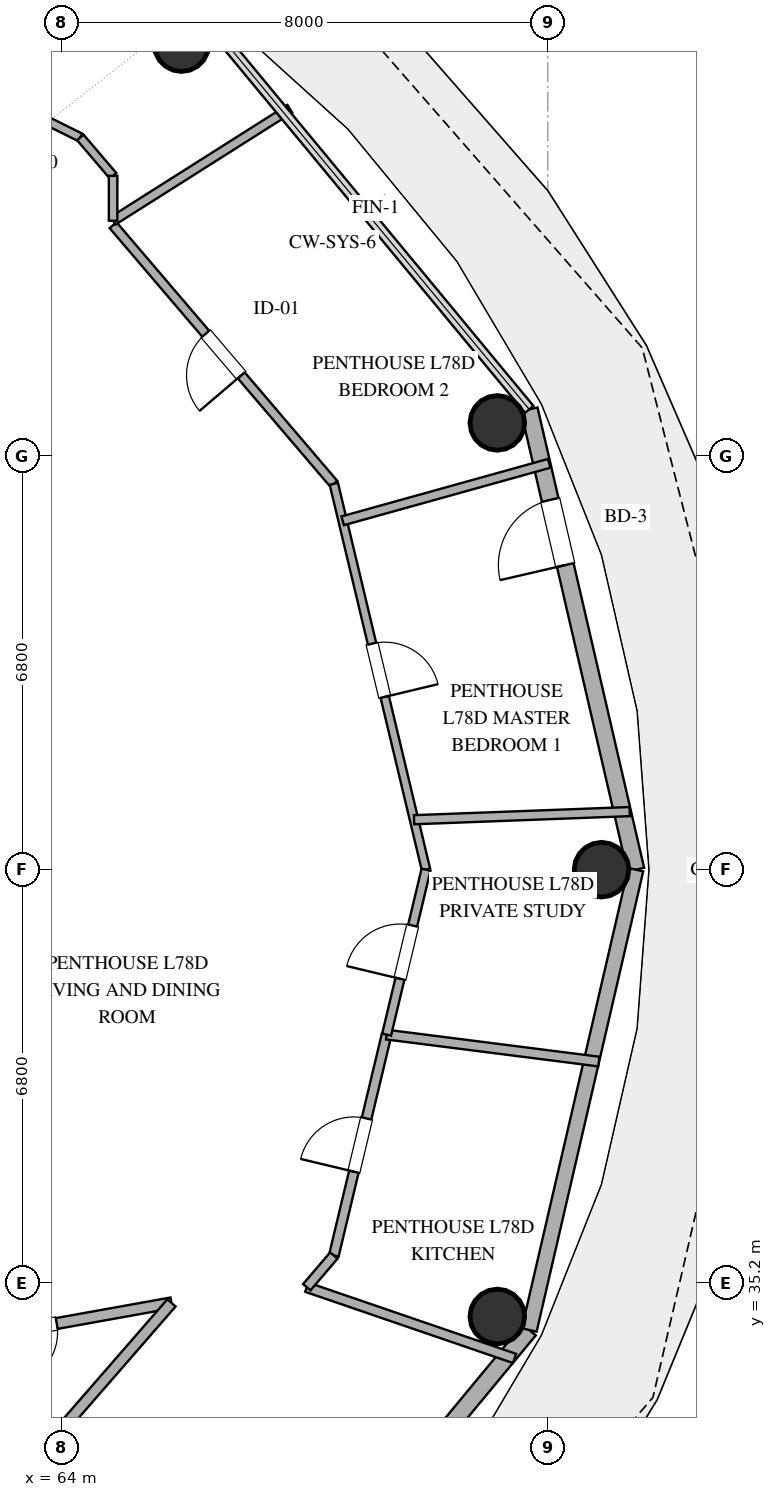
"""IFC4 building model, lengths in metres.
Left out: names, types, materials, properties, quantities, classifications, styles, units other than length and angle.
Written with IfcOpenShell. Run it as: python <this file> out.ifc"""

import sys

from ifc_helpers import new_model, si_unit, direction, frame, frame_2d, origin, origin_2d, place, context, subcontext, project, spatial, rectangle, hollow_circle, extrude, element, fill, save


model = new_model("IFC4")
c1 = context("Model", 3, precision=1e-05, world=origin(), true_north=direction((0.0, 1.0)))
c2 = subcontext(c1, "Body", "Model", "MODEL_VIEW")
j1 = project(units=[si_unit("LENGTHUNIT", "METRE"), si_unit("PLANEANGLEUNIT", "RADIAN")], contexts=[c1])
p1 = place(None, origin())
s1 = spatial("IfcSite", under=j1, at=p1, CompositionType="ELEMENT")
p2 = place(p1, origin())
s2 = spatial("IfcBuilding", under=s1, at=p2, CompositionType="ELEMENT")
p3 = place(p2, frame((0.0, 0.0, 301.8)))
s3 = spatial("IfcBuildingStorey", under=s2, at=p3, CompositionType="ELEMENT", Elevation=301.8)
for number, where, z_axis, x_axis in (
    (1, (72.883, 42.0, 0.0), (0.0, 0.0, 1.0), (1.0, 0.0, 0.0)),
    (2, (71.169, 49.347, 0.0), (0.0, 0.0, 1.0), (1.0, 0.0, 0.0)),
    (3, (65.975, 55.576, 0.0), (0.0, 0.0, 1.0), (1.0, 0.0, 0.0)),
    (4, (71.169, 34.653, 0.0), (0.0, 0.0, 1.0), (1.0, 0.0, 0.0)),
):
    element("IfcColumn", number, at=place(p3, frame(where, z_axis=z_axis, x_axis=x_axis)), inside=s3, PredefinedType="COLUMN", context=c2, shape_type="SweptSolid", body=[
        extrude(hollow_circle(Radius=0.45, WallThickness=0.025, at=origin_2d()), origin(), (0.0, 0.0, 1.0), 3.37),
    ])
p4 = place(p3, frame((73.447, 42.0, 0.0), z_axis=(0.0, 0.0, 1.0), x_axis=(-0.225635078214, 0.974211892495, 0.0)))
e5 = element("IfcWall", 5, at=p4, inside=s3, PredefinedType="SOLIDWALL", context=c2, shape_type="SweptSolid", body=[
    extrude(rectangle(XDim=7.77, YDim=0.28, at=frame_2d((3.885, 0.0))), origin(), (0.0, 0.0, 1.0), 3.37),
])
p5 = place(p4, frame((5.142, 0.0, 0.0)))
e6 = element("IfcOpeningElement", 6, at=p5, cuts=e5, PredefinedType="OPENING", context=c2, shape_type="SweptSolid", body=[
    extrude(rectangle(XDim=1.1, YDim=2.25, at=frame_2d((0.55, 1.125))), frame((0.0, 0.15, 0.0), z_axis=(0.0, -1.0, 0.0), x_axis=(1.0, 0.0, 0.0)), (0.0, 0.0, 1.0), 0.3),
])
p6 = place(p3, frame((66.383, 28.013, 0.0), z_axis=(0.0, 0.0, 1.0), x_axis=(0.63761509934, 0.770355103243, 0.0)))
e7 = element("IfcWall", 7, at=p6, inside=s3, PredefinedType="SOLIDWALL", context=c2, shape_type="SweptSolid", body=[
    extrude(rectangle(XDim=8.33, YDim=0.28, at=frame_2d((4.165, 0.0))), origin(), (0.0, 0.0, 1.0), 3.37),
])
p7 = place(p6, frame((2.326, 0.0, 0.85)))
e8 = element("IfcOpeningElement", 8, at=p7, cuts=e7, PredefinedType="OPENING", context=c2, shape_type="SweptSolid", body=[
    extrude(rectangle(XDim=1.35, YDim=1.8, at=frame_2d((0.675, 0.9))), frame((0.0, 0.15, 0.0), z_axis=(0.0, -1.0, 0.0), x_axis=(1.0, 0.0, 0.0)), (0.0, 0.0, 1.0), 0.3),
])
p8 = place(p6, frame((4.546, 0.0, 0.85)))
e9 = element("IfcOpeningElement", 9, at=p8, cuts=e7, PredefinedType="OPENING", context=c2, shape_type="SweptSolid", body=[
    extrude(rectangle(XDim=1.35, YDim=1.8, at=frame_2d((0.675, 0.9))), frame((0.0, 0.15, 0.0), z_axis=(0.0, -1.0, 0.0), x_axis=(1.0, 0.0, 0.0)), (0.0, 0.0, 1.0), 0.3),
])
p9 = place(p3, frame((71.694, 34.43, 0.0), z_axis=(0.0, 0.0, 1.0), x_axis=(0.225635078214, 0.974211892495, 0.0)))
e10 = element("IfcWall", 10, at=p9, inside=s3, PredefinedType="SOLIDWALL", context=c2, shape_type="SweptSolid", body=[
    extrude(rectangle(XDim=7.77, YDim=0.25, at=frame_2d((3.885, 0.0))), origin(), (0.0, 0.0, 1.0), 3.37),
])
p10 = place(p3, frame((56.704, 35.2, 0.0), z_axis=(0.0, 0.0, 1.0), x_axis=(0.78802314347, -0.615645616695, 0.0)))
e11 = element("IfcWall", 11, at=p10, inside=s3, PredefinedType="PARTITIONING", context=c2, shape_type="SweptSolid", body=[
    extrude(rectangle(XDim=12.034, YDim=0.2, at=frame_2d((6.017, 0.0))), origin(), (0.0, 0.0, 1.0), 2.73),
])
p11 = place(p3, frame((68.481, 48.345, 0.0), z_axis=(0.0, 0.0, 1.0), x_axis=(-0.649208179997, 0.760610767097, 0.0)))
e12 = element("IfcWall", 12, at=p11, inside=s3, PredefinedType="PARTITIONING", context=c2, shape_type="SweptSolid", body=[
    extrude(rectangle(XDim=5.593, YDim=0.15, at=frame_2d((2.796, 0.0))), origin(), (0.0, 0.0, 1.0), 2.73),
])
p12 = place(p11, frame((2.346, 0.0, 0.0)))
e13 = element("IfcOpeningElement", 13, at=p12, cuts=e12, PredefinedType="OPENING", context=c2, shape_type="SweptSolid", body=[
    extrude(rectangle(XDim=0.9, YDim=2.1, at=frame_2d((0.45, 1.05))), frame((0.0, 0.085, 0.0), z_axis=(0.0, -1.0, 0.0), x_axis=(1.0, 0.0, 0.0)), (0.0, 0.0, 1.0), 0.17),
])
p13 = place(p3, frame((68.481, 48.345, 0.0), z_axis=(0.0, 0.0, 1.0), x_axis=(0.232298462197, -0.972644551962, 0.0)))
e14 = element("IfcWall", 14, at=p13, inside=s3, PredefinedType="PARTITIONING", context=c2, shape_type="SweptSolid", body=[
    extrude(rectangle(XDim=6.523, YDim=0.14, at=frame_2d((3.262, 0.0))), origin(), (0.0, 0.0, 1.0), 2.73),
])
p14 = place(p13, frame((2.702, 0.0, 0.0)))
e15 = element("IfcOpeningElement", 15, at=p14, cuts=e14, PredefinedType="OPENING", context=c2, shape_type="SweptSolid", body=[
    extrude(rectangle(XDim=0.9, YDim=2.1, at=frame_2d((0.45, 1.05))), frame((0.0, 0.08, 0.0), z_axis=(0.0, -1.0, 0.0), x_axis=(1.0, 0.0, 0.0)), (0.0, 0.0, 1.0), 0.16),
])
p15 = place(p3, frame((65.81, 34.875, 0.0), z_axis=(0.0, 0.0, 1.0), x_axis=(-0.984255399889, -0.1767521083, 0.0)))
e16 = element("IfcWall", 16, at=p15, inside=s3, PredefinedType="PLUMBINGWALL", context=c2, shape_type="SweptSolid", body=[
    extrude(rectangle(XDim=4.684, YDim=0.18, at=frame_2d((2.342, 0.0))), origin(), (0.0, 0.0, 1.0), 2.73),
])
p16 = place(p15, frame((1.917, 0.0, 0.0)))
e17 = element("IfcOpeningElement", 17, at=p16, cuts=e16, PredefinedType="OPENING", context=c2, shape_type="SweptSolid", body=[
    extrude(rectangle(XDim=0.85, YDim=2.1, at=frame_2d((0.425, 1.05))), frame((0.0, 0.1, 0.0), z_axis=(0.0, -1.0, 0.0), x_axis=(1.0, 0.0, 0.0)), (0.0, 0.0, 1.0), 0.2),
])
p17 = place(p3, frame((68.481, 35.655, 0.0), z_axis=(0.0, 0.0, 1.0), x_axis=(0.232262682455, 0.972653096607, 0.0)))
e18 = element("IfcWall", 18, at=p17, inside=s3, PredefinedType="PLUMBINGWALL", context=c2, shape_type="SweptSolid", body=[
    extrude(rectangle(XDim=3.735, YDim=0.16, at=frame_2d((1.867, 0.0))), origin(), (0.0, 0.0, 1.0), 2.73),
])
p18 = place(p17, frame((1.417, 0.0, 0.0)))
e19 = element("IfcOpeningElement", 19, at=p18, cuts=e18, PredefinedType="OPENING", context=c2, shape_type="SweptSolid", body=[
    extrude(rectangle(XDim=0.9, YDim=2.1, at=frame_2d((0.45, 1.05))), frame((0.0, 0.09, 0.0), z_axis=(0.0, -1.0, 0.0), x_axis=(1.0, 0.0, 0.0)), (0.0, 0.0, 1.0), 0.18),
])
p19 = place(p3, frame((71.452, 33.962, 0.0), z_axis=(0.0, 0.0, 1.0), x_axis=(-0.945979125591, 0.32422753422, 0.0)))
e20 = element("IfcWall", 20, at=p19, inside=s3, PredefinedType="PLUMBINGWALL", context=c2, shape_type="SweptSolid", body=[
    extrude(rectangle(XDim=3.611, YDim=0.16, at=frame_2d((1.806, 0.0))), origin(), (0.0, 0.0, 1.0), 2.73),
])
p20 = place(p3, frame((63.45, 32.163, 0.0), z_axis=(0.0, 0.0, 1.0), x_axis=(0.656415720833, 0.754399364689, 0.0)))
e21 = element("IfcWall", 21, at=p20, inside=s3, PredefinedType="PLUMBINGWALL", context=c2, shape_type="SweptSolid", body=[
    extrude(rectangle(XDim=3.595, YDim=0.18, at=frame_2d((1.798, 0.0))), origin(), (0.0, 0.0, 1.0), 2.73),
])
p21 = place(p3, frame((69.8, 42.822, 0.0), z_axis=(0.0, 0.0, 1.0), x_axis=(0.999291840202, 0.037627358477, 0.0)))
e22 = element("IfcWall", 22, at=p21, inside=s3, PredefinedType="PARTITIONING", context=c2, shape_type="SweptSolid", body=[
    extrude(rectangle(XDim=3.549, YDim=0.15, at=frame_2d((1.774, 0.0))), origin(), (0.0, 0.0, 1.0), 2.73),
])
p22 = place(p3, frame((72.022, 48.682, 0.0), z_axis=(0.0, 0.0, 1.0), x_axis=(-0.963436508671, -0.267936734621, 0.0)))
e23 = element("IfcWall", 23, at=p22, inside=s3, PredefinedType="PARTITIONING", context=c2, shape_type="SweptSolid", body=[
    extrude(rectangle(XDim=3.525, YDim=0.15, at=frame_2d((1.763, 0.0))), origin(), (0.0, 0.0, 1.0), 2.73),
])
p23 = place(p3, frame((72.839, 38.844, 0.0), z_axis=(0.0, 0.0, 1.0), x_axis=(-0.992028222336, 0.126015896178, 0.0)))
e24 = element("IfcWall", 24, at=p23, inside=s3, PredefinedType="PLUMBINGWALL", context=c2, shape_type="SweptSolid", body=[
    extrude(rectangle(XDim=3.518, YDim=0.16, at=frame_2d((1.759, 0.0))), origin(), (0.0, 0.0, 1.0), 2.73),
])
p24 = place(p3, frame((64.85, 52.672, 0.0), z_axis=(0.0, 0.0, 1.0), x_axis=(0.84478165195, 0.535111166515, 0.0)))
e25 = element("IfcWall", 25, at=p24, inside=s3, PredefinedType="PARTITIONING", context=c2, shape_type="SweptSolid", body=[
    extrude(rectangle(XDim=3.44, YDim=0.15, at=frame_2d((1.72, 0.0))), origin(), (0.0, 0.0, 1.0), 2.73),
])
p25 = place(p3, frame((69.348, 39.288, 0.0), z_axis=(0.0, 0.0, 1.0), x_axis=(0.232346378521, 0.972633106772, 0.0)))
e26 = element("IfcWall", 26, at=p25, inside=s3, PredefinedType="PARTITIONING", context=c2, shape_type="SweptSolid", body=[
    extrude(rectangle(XDim=2.789, YDim=0.15, at=frame_2d((1.395, 0.0))), origin(), (0.0, 0.0, 1.0), 2.73),
])
p26 = place(p25, frame((0.944, 0.0, 0.0)))
e27 = element("IfcOpeningElement", 27, at=p26, cuts=e26, PredefinedType="OPENING", context=c2, shape_type="SweptSolid", body=[
    extrude(rectangle(XDim=0.9, YDim=2.1, at=frame_2d((0.45, 1.05))), frame((0.0, 0.085, 0.0), z_axis=(0.0, -1.0, 0.0), x_axis=(1.0, 0.0, 0.0)), (0.0, 0.0, 1.0), 0.17),
])
p27 = place(p3, frame((64.311, 54.042, 0.0), z_axis=(0.0, 0.0, 1.0), x_axis=(-0.895409226325, 0.445244109912, 0.0)))
e28 = element("IfcWall", 28, at=p27, inside=s3, PredefinedType="PARTITIONING", context=c2, shape_type="SweptSolid", body=[
    extrude(rectangle(XDim=1.141, YDim=0.14, at=frame_2d((0.571, 0.0))), origin(), (0.0, 0.0, 1.0), 2.73),
])
p28 = place(p3, frame((64.85, 53.41, 0.0), z_axis=(0.0, 0.0, 1.0), x_axis=(-0.649191857323, 0.760624698774, 0.0)))
e29 = element("IfcWall", 29, at=p28, inside=s3, PredefinedType="PARTITIONING", context=c2, shape_type="SweptSolid", body=[
    extrude(rectangle(XDim=0.83, YDim=0.14, at=frame_2d((0.415, 0.0))), origin(), (0.0, 0.0, 1.0), 2.73),
])
p29 = place(p3, frame((64.85, 52.672, 0.0), z_axis=(0.0, 0.0, 1.0), x_axis=(0.0, 1.0, 0.0)))
e30 = element("IfcWall", 30, at=p29, inside=s3, PredefinedType="PARTITIONING", context=c2, shape_type="SweptSolid", body=[
    extrude(rectangle(XDim=0.739, YDim=0.14, at=frame_2d((0.369, 0.0))), origin(), (0.0, 0.0, 1.0), 2.73),
])
p30 = place(p3, frame((68.036, 35.133, 0.0), z_axis=(0.0, 0.0, 1.0), x_axis=(0.649207140033, 0.760611654743, 0.0)))
e31 = element("IfcWall", 31, at=p30, inside=s3, PredefinedType="PLUMBINGWALL", context=c2, shape_type="SweptSolid", body=[
    extrude(rectangle(XDim=0.686, YDim=0.16, at=frame_2d((0.343, 0.0))), origin(), (0.0, 0.0, 1.0), 2.73),
])
p31 = place(p5, origin())
e32 = element("IfcDoor", 32, at=p31, inside=s3, OperationType="SINGLE_SWING_LEFT", PredefinedType="DOOR", context=c2, shape_type="SweptSolid", body=[
    extrude(rectangle(XDim=1.1, YDim=2.25, at=frame_2d((0.55, 1.125))), frame((0.0, 0.025, 0.0), z_axis=(0.0, -1.0, 0.0), x_axis=(1.0, 0.0, 0.0)), (0.0, 0.0, 1.0), 0.05),
])
fill(e6, e32)
p32 = place(p12, origin())
e33 = element("IfcDoor", 33, at=p32, inside=s3, OperationType="SINGLE_SWING_LEFT", PredefinedType="DOOR", context=c2, shape_type="SweptSolid", body=[
    extrude(rectangle(XDim=0.9, YDim=2.1, at=frame_2d((0.45, 1.05))), frame((0.0, 0.025, 0.0), z_axis=(0.0, -1.0, 0.0), x_axis=(1.0, 0.0, 0.0)), (0.0, 0.0, 1.0), 0.05),
])
fill(e13, e33)
p33 = place(p14, origin())
e34 = element("IfcDoor", 34, at=p33, inside=s3, OperationType="SINGLE_SWING_RIGHT", PredefinedType="DOOR", context=c2, shape_type="SweptSolid", body=[
    extrude(rectangle(XDim=0.9, YDim=2.1, at=frame_2d((0.45, 1.05))), frame((0.0, 0.025, 0.0), z_axis=(0.0, -1.0, 0.0), x_axis=(1.0, 0.0, 0.0)), (0.0, 0.0, 1.0), 0.05),
])
fill(e15, e34)
p34 = place(p16, origin())
e35 = element("IfcDoor", 35, at=p34, inside=s3, OperationType="SINGLE_SWING_RIGHT", PredefinedType="DOOR", context=c2, shape_type="SweptSolid", body=[
    extrude(rectangle(XDim=0.85, YDim=2.1, at=frame_2d((0.425, 1.05))), frame((0.0, 0.025, 0.0), z_axis=(0.0, -1.0, 0.0), x_axis=(1.0, 0.0, 0.0)), (0.0, 0.0, 1.0), 0.05),
])
fill(e17, e35)
p35 = place(p18, origin())
e36 = element("IfcDoor", 36, at=p35, inside=s3, OperationType="SINGLE_SWING_LEFT", PredefinedType="DOOR", context=c2, shape_type="SweptSolid", body=[
    extrude(rectangle(XDim=0.9, YDim=2.1, at=frame_2d((0.45, 1.05))), frame((0.0, 0.025, 0.0), z_axis=(0.0, -1.0, 0.0), x_axis=(1.0, 0.0, 0.0)), (0.0, 0.0, 1.0), 0.05),
])
fill(e19, e36)
p36 = place(p26, origin())
e37 = element("IfcDoor", 37, at=p36, inside=s3, OperationType="SINGLE_SWING_LEFT", PredefinedType="DOOR", context=c2, shape_type="SweptSolid", body=[
    extrude(rectangle(XDim=0.9, YDim=2.1, at=frame_2d((0.45, 1.05))), frame((0.0, 0.025, 0.0), z_axis=(0.0, -1.0, 0.0), x_axis=(1.0, 0.0, 0.0)), (0.0, 0.0, 1.0), 0.05),
])
fill(e27, e37)
save(model, sys.argv[1])
